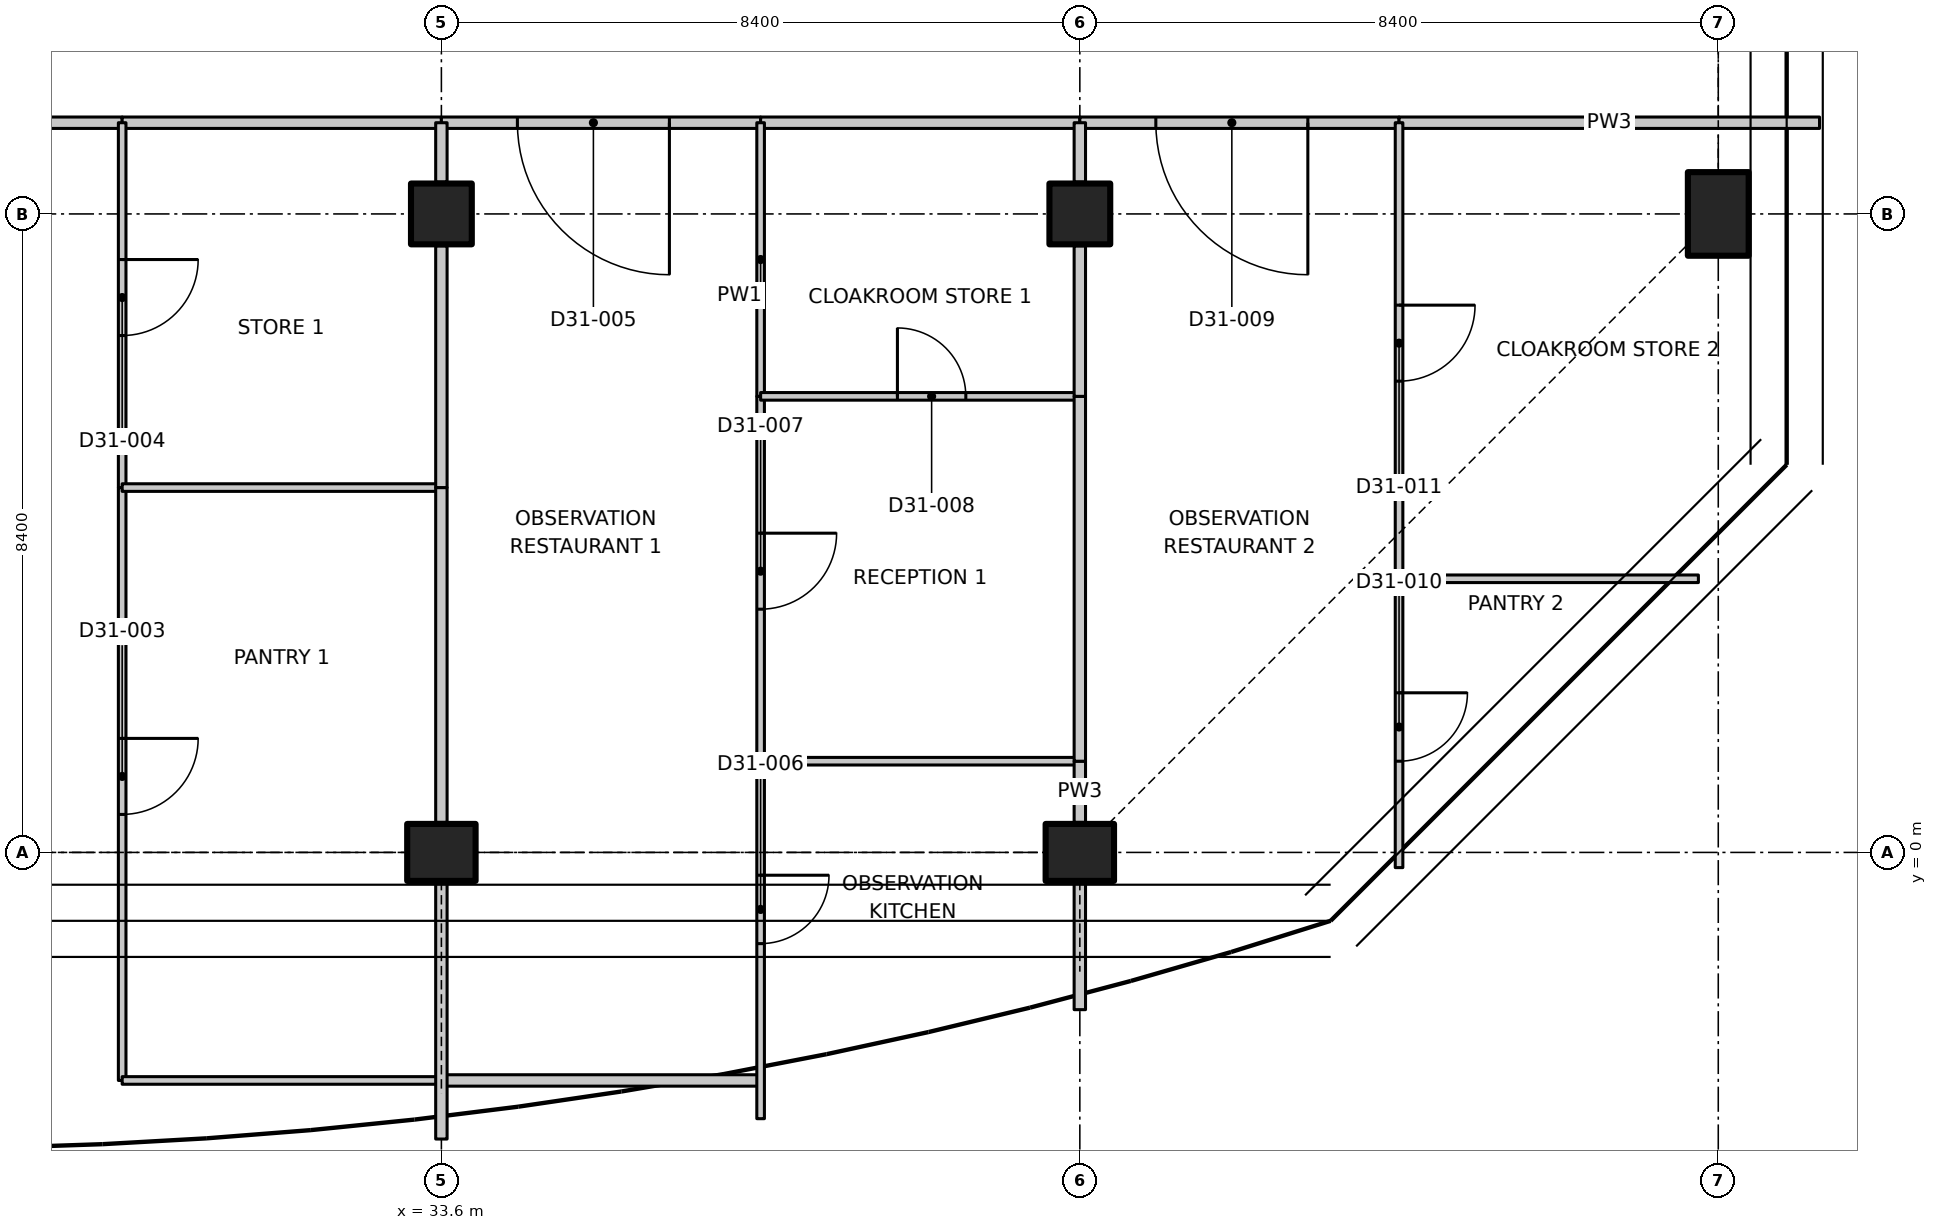
"""IFC4 building model, lengths in metres.
Left out: names, types, materials, properties, quantities, classifications, styles, units other than length and angle.
Written with IfcOpenShell. Run it as: python <this file> out.ifc"""

import sys

from ifc_helpers import new_model, si_unit, direction, frame, frame_2d, origin, origin_2d, place, context, subcontext, project, spatial, polyline, rectangle, outline, extrude, element, fill, save


model = new_model("IFC4")
c1 = context("Model", 3, precision=1e-05, world=origin(), true_north=direction((0.0, 1.0)))
c2 = subcontext(c1, "Body", "Model", "MODEL_VIEW")
j1 = project(units=[si_unit("LENGTHUNIT", "METRE"), si_unit("PLANEANGLEUNIT", "RADIAN")], contexts=[c1])
p1 = place(None, origin())
s1 = spatial("IfcSite", under=j1, at=p1, CompositionType="ELEMENT")
p2 = place(p1, origin())
s2 = spatial("IfcBuilding", under=s1, at=p2, CompositionType="ELEMENT")
p3 = place(p2, frame((0.0, 0.0, 251.7)))
s3 = spatial("IfcBuildingStorey", under=s2, at=p3, CompositionType="ELEMENT", Elevation=251.7)
p4 = place(p3, frame((33.6, 0.0, 0.0), z_axis=(0.0, 0.0, 1.0), x_axis=(0.0, 1.0, 0.0)))
e1 = element("IfcColumn", 1, at=p4, inside=s3, PredefinedType="COLUMN", context=c2, shape_type="SweptSolid", body=[
    extrude(rectangle(XDim=0.75, YDim=0.9, at=origin_2d()), origin(), (0.0, 0.0, 1.0), 4.05),
])
p5 = place(p3, frame((33.6, 8.4, 0.0), z_axis=(0.0, 0.0, 1.0), x_axis=(1.0, 0.0, 0.0)))
e2 = element("IfcColumn", 2, at=p5, inside=s3, PredefinedType="COLUMN", context=c2, shape_type="SweptSolid", body=[
    extrude(rectangle(XDim=0.8, YDim=0.8, at=origin_2d()), origin(), (0.0, 0.0, 1.0), 4.05),
])
p6 = place(p3, frame((42.0, 0.0, 0.0), z_axis=(0.0, 0.0, 1.0), x_axis=(0.0, 1.0, 0.0)))
e3 = element("IfcColumn", 3, at=p6, inside=s3, PredefinedType="COLUMN", context=c2, shape_type="SweptSolid", body=[
    extrude(rectangle(XDim=0.75, YDim=0.9, at=origin_2d()), origin(), (0.0, 0.0, 1.0), 4.05),
])
p7 = place(p3, frame((42.0, 8.4, 0.0), z_axis=(0.0, 0.0, 1.0), x_axis=(1.0, 0.0, 0.0)))
e4 = element("IfcColumn", 4, at=p7, inside=s3, PredefinedType="COLUMN", context=c2, shape_type="SweptSolid", body=[
    extrude(rectangle(XDim=0.8, YDim=0.8, at=origin_2d()), origin(), (0.0, 0.0, 1.0), 4.05),
])
p8 = place(p3, frame((50.4, 8.4, 0.0), z_axis=(0.0, 0.0, 1.0), x_axis=(1.0, 0.0, 0.0)))
e5 = element("IfcColumn", 5, at=p8, inside=s3, PredefinedType="COLUMN", context=c2, shape_type="SweptSolid", body=[
    extrude(rectangle(XDim=0.8, YDim=1.1, at=origin_2d()), origin(), (0.0, 0.0, 1.0), 4.05),
])
p9 = place(p3, frame((29.4, 9.6, 0.0), z_axis=(0.0, 0.0, 1.0), x_axis=(-1.0, 0.0, 0.0)))
e6 = element("IfcWall", 6, at=p9, inside=s3, PredefinedType="PARTITIONING", context=c2, shape_type="SweptSolid", body=[
    extrude(rectangle(XDim=4.2, YDim=0.15, at=frame_2d((2.1, 0.0))), origin(), (0.0, 0.0, 1.0), 4.03),
])
p10 = place(p9, frame((1.2, 0.0, 0.0)))
e7 = element("IfcOpeningElement", 7, at=p10, cuts=e6, PredefinedType="OPENING", context=c2, shape_type="SweptSolid", body=[
    extrude(rectangle(XDim=1.6, YDim=2.1, at=frame_2d((0.8, 1.05))), frame((0.0, 0.085, 0.0), z_axis=(0.0, -1.0, 0.0), x_axis=(1.0, 0.0, 0.0)), (0.0, 0.0, 1.0), 0.17),
])
p11 = place(p3, frame((33.6, 9.6, 0.0), z_axis=(0.0, 0.0, 1.0), x_axis=(-1.0, 0.0, 0.0)))
e8 = element("IfcWall", 8, at=p11, inside=s3, PredefinedType="PARTITIONING", context=c2, shape_type="SweptSolid", body=[
    extrude(rectangle(XDim=4.2, YDim=0.15, at=frame_2d((2.1, 0.0))), origin(), (0.0, 0.0, 1.0), 4.03),
])
p12 = place(p3, frame((37.8, 9.6, 0.0), z_axis=(0.0, 0.0, 1.0), x_axis=(-1.0, 0.0, 0.0)))
e9 = element("IfcWall", 9, at=p12, inside=s3, PredefinedType="PARTITIONING", context=c2, shape_type="SweptSolid", body=[
    extrude(rectangle(XDim=4.2, YDim=0.15, at=frame_2d((2.1, 0.0))), origin(), (0.0, 0.0, 1.0), 4.03),
])
p13 = place(p12, frame((1.2, 0.0, 0.0)))
e10 = element("IfcOpeningElement", 10, at=p13, cuts=e9, PredefinedType="OPENING", context=c2, shape_type="SweptSolid", body=[
    extrude(rectangle(XDim=2.0, YDim=2.4, at=frame_2d((1.0, 1.2))), frame((0.0, 0.085, 0.0), z_axis=(0.0, -1.0, 0.0), x_axis=(1.0, 0.0, 0.0)), (0.0, 0.0, 1.0), 0.17),
])
p14 = place(p3, frame((42.0, 9.6, 0.0), z_axis=(0.0, 0.0, 1.0), x_axis=(-1.0, 0.0, 0.0)))
e11 = element("IfcWall", 11, at=p14, inside=s3, PredefinedType="PARTITIONING", context=c2, shape_type="SweptSolid", body=[
    extrude(rectangle(XDim=4.2, YDim=0.15, at=frame_2d((2.1, 0.0))), origin(), (0.0, 0.0, 1.0), 4.03),
])
p15 = place(p3, frame((46.2, 9.6, 0.0), z_axis=(0.0, 0.0, 1.0), x_axis=(-1.0, 0.0, 0.0)))
e12 = element("IfcWall", 12, at=p15, inside=s3, PredefinedType="PARTITIONING", context=c2, shape_type="SweptSolid", body=[
    extrude(rectangle(XDim=4.2, YDim=0.15, at=frame_2d((2.1, 0.0))), origin(), (0.0, 0.0, 1.0), 4.03),
])
p16 = place(p15, frame((1.2, 0.0, 0.0)))
e13 = element("IfcOpeningElement", 13, at=p16, cuts=e12, PredefinedType="OPENING", context=c2, shape_type="SweptSolid", body=[
    extrude(rectangle(XDim=2.0, YDim=2.4, at=frame_2d((1.0, 1.2))), frame((0.0, 0.085, 0.0), z_axis=(0.0, -1.0, 0.0), x_axis=(1.0, 0.0, 0.0)), (0.0, 0.0, 1.0), 0.17),
])
p17 = place(p3, frame((51.732, 9.6, 0.0), z_axis=(0.0, 0.0, 1.0), x_axis=(-1.0, 0.0, 0.0)))
e14 = element("IfcWall", 14, at=p17, inside=s3, PredefinedType="PARTITIONING", context=c2, shape_type="SweptSolid", body=[
    extrude(outline(polyline([(0.0, 0.0), (5.532, 0.0), (5.532, 4.03), (1.782, 4.03), (1.78, 3.68), (0.884, 3.68), (0.882, 4.03), (0.252, 4.03), (0.0, 4.03), (0.0, 0.0)])), frame((0.0, 0.075, 0.0), z_axis=(0.0, -1.0, 0.0), x_axis=(1.0, 0.0, 0.0)), (0.0, 0.0, 1.0), 0.15),
])
p18 = place(p3, frame((29.4, 4.8, 0.0), z_axis=(0.0, 0.0, 1.0), x_axis=(0.0, -1.0, 0.0)))
e15 = element("IfcWall", 15, at=p18, inside=s3, PredefinedType="PARTITIONING", context=c2, shape_type="SweptSolid", body=[
    extrude(outline(polyline([(0.0, 0.0), (7.8, 0.0), (7.8, 4.03), (5.25, 4.03), (5.248, 3.68), (4.352, 3.68), (4.35, 4.03), (0.0, 4.03), (0.0, 0.0)])), frame((0.0, 0.05, 0.0), z_axis=(0.0, -1.0, 0.0), x_axis=(1.0, 0.0, 0.0)), (0.0, 0.0, 1.0), 0.1),
])
p19 = place(p18, frame((3.3, 0.0, 0.0)))
e16 = element("IfcOpeningElement", 16, at=p19, cuts=e15, PredefinedType="OPENING", context=c2, shape_type="SweptSolid", body=[
    extrude(rectangle(XDim=1.0, YDim=2.1, at=frame_2d((0.5, 1.05))), frame((0.0, 0.06, 0.0), z_axis=(0.0, -1.0, 0.0), x_axis=(1.0, 0.0, 0.0)), (0.0, 0.0, 1.0), 0.12),
])
p20 = place(p3, frame((29.4, -3.0, 0.0), z_axis=(0.0, 0.0, 1.0), x_axis=(1.0, 0.0, 0.0)))
e17 = element("IfcWall", 17, at=p20, inside=s3, PredefinedType="PARTITIONING", context=c2, shape_type="SweptSolid", body=[
    extrude(rectangle(XDim=4.2, YDim=0.1, at=frame_2d((2.1, 0.0))), origin(), (0.0, 0.0, 1.0), 3.68),
])
p21 = place(p3, frame((29.4, 9.6, 0.0), z_axis=(0.0, 0.0, 1.0), x_axis=(0.0, -1.0, 0.0)))
e18 = element("IfcWall", 18, at=p21, inside=s3, PredefinedType="PARTITIONING", context=c2, shape_type="SweptSolid", body=[
    extrude(rectangle(XDim=4.8, YDim=0.1, at=frame_2d((2.4, 0.0))), origin(), (0.0, 0.0, 1.0), 4.03),
])
p22 = place(p21, frame((1.8, 0.0, 0.0)))
e19 = element("IfcOpeningElement", 19, at=p22, cuts=e18, PredefinedType="OPENING", context=c2, shape_type="SweptSolid", body=[
    extrude(rectangle(XDim=1.0, YDim=2.1, at=frame_2d((0.5, 1.05))), frame((0.0, 0.06, 0.0), z_axis=(0.0, -1.0, 0.0), x_axis=(1.0, 0.0, 0.0)), (0.0, 0.0, 1.0), 0.12),
])
p23 = place(p3, frame((33.6, -3.0, 0.0), z_axis=(0.0, 0.0, 1.0), x_axis=(1.0, 0.0, 0.0)))
e20 = element("IfcWall", 20, at=p23, inside=s3, PredefinedType="PARTITIONING", context=c2, shape_type="SweptSolid", body=[
    extrude(rectangle(XDim=4.236, YDim=0.15, at=frame_2d((2.118, 0.0))), origin(), (0.0, 0.0, 1.0), 3.68),
])
p24 = place(p3, frame((29.4, 4.8, 0.0), z_axis=(0.0, 0.0, 1.0), x_axis=(1.0, 0.0, 0.0)))
e21 = element("IfcWall", 21, at=p24, inside=s3, PredefinedType="PARTITIONING", context=c2, shape_type="SweptSolid", body=[
    extrude(rectangle(XDim=4.2, YDim=0.1, at=frame_2d((2.1, 0.0))), origin(), (0.0, 0.0, 1.0), 4.03),
])
p25 = place(p3, frame((33.6, 4.8, 0.0), z_axis=(0.0, 0.0, 1.0), x_axis=(0.0, -1.0, 0.0)))
e22 = element("IfcWall", 22, at=p25, inside=s3, PredefinedType="PARTITIONING", context=c2, shape_type="SweptSolid", body=[
    extrude(rectangle(XDim=4.405, YDim=0.15, at=frame_2d((2.203, 0.0))), origin(), (0.0, 0.0, 1.0), 3.68),
])
p26 = place(p3, frame((33.6, -0.395, 0.0), z_axis=(0.0, 0.0, 1.0), x_axis=(0.0, -1.0, 0.0)))
e23 = element("IfcWall", 23, at=p26, inside=s3, PredefinedType="PARTITIONING", context=c2, shape_type="SweptSolid", body=[
    extrude(rectangle(XDim=3.376, YDim=0.15, at=frame_2d((1.688, 0.0))), origin(), (0.0, 0.0, 1.0), 3.68),
])
p27 = place(p3, frame((33.6, 9.6, 0.0), z_axis=(0.0, 0.0, 1.0), x_axis=(0.0, -1.0, 0.0)))
e24 = element("IfcWall", 24, at=p27, inside=s3, PredefinedType="PARTITIONING", context=c2, shape_type="SweptSolid", body=[
    extrude(rectangle(XDim=0.78, YDim=0.15, at=frame_2d((0.39, 0.0))), origin(), (0.0, 0.0, 1.0), 4.03),
])
p28 = place(p3, frame((33.6, 7.98, 0.0), z_axis=(0.0, 0.0, 1.0), x_axis=(0.0, -1.0, 0.0)))
e25 = element("IfcWall", 25, at=p28, inside=s3, PredefinedType="PARTITIONING", context=c2, shape_type="SweptSolid", body=[
    extrude(rectangle(XDim=3.18, YDim=0.15, at=frame_2d((1.59, 0.0))), origin(), (0.0, 0.0, 1.0), 4.03),
])
p29 = place(p3, frame((37.8, 1.2, 0.0), z_axis=(0.0, 0.0, 1.0), x_axis=(0.0, -1.0, 0.0)))
e26 = element("IfcWall", 26, at=p29, inside=s3, PredefinedType="PARTITIONING", context=c2, shape_type="SweptSolid", body=[
    extrude(rectangle(XDim=4.703, YDim=0.1, at=frame_2d((2.352, 0.0))), origin(), (0.0, 0.0, 1.0), 3.68),
])
p30 = place(p29, frame((1.5, 0.0, 0.0)))
e27 = element("IfcOpeningElement", 27, at=p30, cuts=e26, PredefinedType="OPENING", context=c2, shape_type="SweptSolid", body=[
    extrude(rectangle(XDim=0.9, YDim=2.1, at=frame_2d((0.45, 1.05))), frame((0.0, 0.06, 0.0), z_axis=(0.0, -1.0, 0.0), x_axis=(1.0, 0.0, 0.0)), (0.0, 0.0, 1.0), 0.12),
])
p31 = place(p3, frame((37.8, 6.0, 0.0), z_axis=(0.0, 0.0, 1.0), x_axis=(0.0, -1.0, 0.0)))
e28 = element("IfcWall", 28, at=p31, inside=s3, PredefinedType="PARTITIONING", context=c2, shape_type="SweptSolid", body=[
    extrude(rectangle(XDim=4.8, YDim=0.1, at=frame_2d((2.4, 0.0))), origin(), (0.0, 0.0, 1.0), 4.03),
])
p32 = place(p31, frame((1.8, 0.0, 0.0)))
e29 = element("IfcOpeningElement", 29, at=p32, cuts=e28, PredefinedType="OPENING", context=c2, shape_type="SweptSolid", body=[
    extrude(rectangle(XDim=1.0, YDim=2.1, at=frame_2d((0.5, 1.05))), frame((0.0, 0.06, 0.0), z_axis=(0.0, -1.0, 0.0), x_axis=(1.0, 0.0, 0.0)), (0.0, 0.0, 1.0), 0.12),
])
p33 = place(p3, frame((37.8, 9.6, 0.0), z_axis=(0.0, 0.0, 1.0), x_axis=(0.0, -1.0, 0.0)))
e30 = element("IfcWall", 30, at=p33, inside=s3, PredefinedType="PARTITIONING", context=c2, shape_type="SweptSolid", body=[
    extrude(rectangle(XDim=3.6, YDim=0.1, at=frame_2d((1.8, 0.0))), origin(), (0.0, 0.0, 1.0), 4.03),
])
p34 = place(p3, frame((37.8, 1.2, 0.0), z_axis=(0.0, 0.0, 1.0), x_axis=(1.0, 0.0, 0.0)))
e31 = element("IfcWall", 31, at=p34, inside=s3, PredefinedType="PARTITIONING", context=c2, shape_type="SweptSolid", body=[
    extrude(rectangle(XDim=4.2, YDim=0.1, at=frame_2d((2.1, 0.0))), origin(), (0.0, 0.0, 1.0), 4.03),
])
p35 = place(p3, frame((42.0, 1.2, 0.0), z_axis=(0.0, 0.0, 1.0), x_axis=(0.0, -1.0, 0.0)))
e32 = element("IfcWall", 32, at=p35, inside=s3, PredefinedType="PARTITIONING", context=c2, shape_type="SweptSolid", body=[
    extrude(rectangle(XDim=0.805, YDim=0.15, at=frame_2d((0.402, 0.0))), origin(), (0.0, 0.0, 1.0), 3.68),
])
p36 = place(p3, frame((42.0, -0.395, 0.0), z_axis=(0.0, 0.0, 1.0), x_axis=(0.0, -1.0, 0.0)))
e33 = element("IfcWall", 33, at=p36, inside=s3, PredefinedType="PARTITIONING", context=c2, shape_type="SweptSolid", body=[
    extrude(rectangle(XDim=1.674, YDim=0.15, at=frame_2d((0.837, 0.0))), origin(), (0.0, 0.0, 1.0), 3.68),
])
p37 = place(p3, frame((37.8, 6.0, 0.0), z_axis=(0.0, 0.0, 1.0), x_axis=(1.0, 0.0, 0.0)))
e34 = element("IfcWall", 34, at=p37, inside=s3, PredefinedType="PARTITIONING", context=c2, shape_type="SweptSolid", body=[
    extrude(rectangle(XDim=4.2, YDim=0.1, at=frame_2d((2.1, 0.0))), origin(), (0.0, 0.0, 1.0), 4.03),
])
p38 = place(p37, frame((1.8, 0.0, 0.0)))
e35 = element("IfcOpeningElement", 35, at=p38, cuts=e34, PredefinedType="OPENING", context=c2, shape_type="SweptSolid", body=[
    extrude(rectangle(XDim=0.9, YDim=2.1, at=frame_2d((0.45, 1.05))), frame((0.0, 0.06, 0.0), z_axis=(0.0, -1.0, 0.0), x_axis=(1.0, 0.0, 0.0)), (0.0, 0.0, 1.0), 0.12),
])
p39 = place(p3, frame((42.0, 6.0, 0.0), z_axis=(0.0, 0.0, 1.0), x_axis=(0.0, -1.0, 0.0)))
e36 = element("IfcWall", 36, at=p39, inside=s3, PredefinedType="PARTITIONING", context=c2, shape_type="SweptSolid", body=[
    extrude(rectangle(XDim=4.8, YDim=0.15, at=frame_2d((2.4, 0.0))), origin(), (0.0, 0.0, 1.0), 4.03),
])
p40 = place(p3, frame((42.0, 9.6, 0.0), z_axis=(0.0, 0.0, 1.0), x_axis=(0.0, -1.0, 0.0)))
e37 = element("IfcWall", 37, at=p40, inside=s3, PredefinedType="PARTITIONING", context=c2, shape_type="SweptSolid", body=[
    extrude(rectangle(XDim=0.78, YDim=0.15, at=frame_2d((0.39, 0.0))), origin(), (0.0, 0.0, 1.0), 4.03),
])
p41 = place(p3, frame((42.0, 7.98, 0.0), z_axis=(0.0, 0.0, 1.0), x_axis=(0.0, -1.0, 0.0)))
e38 = element("IfcWall", 38, at=p41, inside=s3, PredefinedType="PARTITIONING", context=c2, shape_type="SweptSolid", body=[
    extrude(rectangle(XDim=1.98, YDim=0.15, at=frame_2d((0.99, 0.0))), origin(), (0.0, 0.0, 1.0), 4.03),
])
p42 = place(p3, frame((46.2, 3.6, 0.0), z_axis=(0.0, 0.0, 1.0), x_axis=(0.0, -1.0, 0.0)))
e39 = element("IfcWall", 39, at=p42, inside=s3, PredefinedType="PARTITIONING", context=c2, shape_type="SweptSolid", body=[
    extrude(rectangle(XDim=3.8, YDim=0.1, at=frame_2d((1.9, 0.0))), origin(), (0.0, 0.0, 1.0), 3.68),
])
p43 = place(p42, frame((1.5, 0.0, 0.0)))
e40 = element("IfcOpeningElement", 40, at=p43, cuts=e39, PredefinedType="OPENING", context=c2, shape_type="SweptSolid", body=[
    extrude(rectangle(XDim=0.9, YDim=2.1, at=frame_2d((0.45, 1.05))), frame((0.0, 0.06, 0.0), z_axis=(0.0, -1.0, 0.0), x_axis=(1.0, 0.0, 0.0)), (0.0, 0.0, 1.0), 0.12),
])
p44 = place(p3, frame((46.2, 9.6, 0.0), z_axis=(0.0, 0.0, 1.0), x_axis=(0.0, -1.0, 0.0)))
e41 = element("IfcWall", 41, at=p44, inside=s3, PredefinedType="PARTITIONING", context=c2, shape_type="SweptSolid", body=[
    extrude(outline(polyline([(0.0, 0.0), (6.0, 0.0), (6.0, 3.68), (4.736, 3.68), (4.734, 4.03), (0.0, 4.03), (0.0, 0.0)])), frame((0.0, 0.05, 0.0), z_axis=(0.0, -1.0, 0.0), x_axis=(1.0, 0.0, 0.0)), (0.0, 0.0, 1.0), 0.1),
])
p45 = place(p44, frame((2.4, 0.0, 0.0)))
e42 = element("IfcOpeningElement", 42, at=p45, cuts=e41, PredefinedType="OPENING", context=c2, shape_type="SweptSolid", body=[
    extrude(rectangle(XDim=1.0, YDim=2.1, at=frame_2d((0.5, 1.05))), frame((0.0, 0.06, 0.0), z_axis=(0.0, -1.0, 0.0), x_axis=(1.0, 0.0, 0.0)), (0.0, 0.0, 1.0), 0.12),
])
p46 = place(p3, frame((46.2, 3.6, 0.0), z_axis=(0.0, 0.0, 1.0), x_axis=(1.0, 0.0, 0.0)))
e43 = element("IfcWall", 43, at=p46, inside=s3, PredefinedType="PARTITIONING", context=c2, shape_type="SweptSolid", body=[
    extrude(rectangle(XDim=3.938, YDim=0.1, at=frame_2d((1.969, 0.0))), origin(), (0.0, 0.0, 1.0), 3.68),
])
p47 = place(p19, origin())
e44 = element("IfcDoor", 44, at=p47, inside=s3, OperationType="SINGLE_SWING_LEFT", PredefinedType="DOOR", context=c2, shape_type="SweptSolid", body=[
    extrude(rectangle(XDim=1.0, YDim=2.1, at=frame_2d((0.5, 1.05))), frame((0.0, 0.025, 0.0), z_axis=(0.0, -1.0, 0.0), x_axis=(1.0, 0.0, 0.0)), (0.0, 0.0, 1.0), 0.05),
])
fill(e16, e44)
p48 = place(p22, origin())
e45 = element("IfcDoor", 45, at=p48, inside=s3, OperationType="SINGLE_SWING_LEFT", PredefinedType="DOOR", context=c2, shape_type="SweptSolid", body=[
    extrude(rectangle(XDim=1.0, YDim=2.1, at=frame_2d((0.5, 1.05))), frame((0.0, 0.025, 0.0), z_axis=(0.0, -1.0, 0.0), x_axis=(1.0, 0.0, 0.0)), (0.0, 0.0, 1.0), 0.05),
])
fill(e19, e45)
p49 = place(p13, origin())
e46 = element("IfcDoor", 46, at=p49, inside=s3, OperationType="DOUBLE_DOOR_SINGLE_SWING", PredefinedType="DOOR", context=c2, shape_type="SweptSolid", body=[
    extrude(rectangle(XDim=2.0, YDim=2.4, at=frame_2d((1.0, 1.2))), frame((0.0, 0.025, 0.0), z_axis=(0.0, -1.0, 0.0), x_axis=(1.0, 0.0, 0.0)), (0.0, 0.0, 1.0), 0.05),
])
fill(e10, e46)
p50 = place(p30, origin())
e47 = element("IfcDoor", 47, at=p50, inside=s3, OperationType="SINGLE_SWING_LEFT", PredefinedType="DOOR", context=c2, shape_type="SweptSolid", body=[
    extrude(rectangle(XDim=0.9, YDim=2.1, at=frame_2d((0.45, 1.05))), frame((0.0, 0.025, 0.0), z_axis=(0.0, -1.0, 0.0), x_axis=(1.0, 0.0, 0.0)), (0.0, 0.0, 1.0), 0.05),
])
fill(e27, e47)
p51 = place(p32, origin())
e48 = element("IfcDoor", 48, at=p51, inside=s3, OperationType="SINGLE_SWING_LEFT", PredefinedType="DOOR", context=c2, shape_type="SweptSolid", body=[
    extrude(rectangle(XDim=1.0, YDim=2.1, at=frame_2d((0.5, 1.05))), frame((0.0, 0.025, 0.0), z_axis=(0.0, -1.0, 0.0), x_axis=(1.0, 0.0, 0.0)), (0.0, 0.0, 1.0), 0.05),
])
fill(e29, e48)
p52 = place(p38, origin())
e49 = element("IfcDoor", 49, at=p52, inside=s3, OperationType="SINGLE_SWING_LEFT", PredefinedType="DOOR", context=c2, shape_type="SweptSolid", body=[
    extrude(rectangle(XDim=0.9, YDim=2.1, at=frame_2d((0.45, 1.05))), frame((0.0, 0.025, 0.0), z_axis=(0.0, -1.0, 0.0), x_axis=(1.0, 0.0, 0.0)), (0.0, 0.0, 1.0), 0.05),
])
fill(e35, e49)
p53 = place(p16, origin())
e50 = element("IfcDoor", 50, at=p53, inside=s3, OperationType="DOUBLE_DOOR_SINGLE_SWING", PredefinedType="DOOR", context=c2, shape_type="SweptSolid", body=[
    extrude(rectangle(XDim=2.0, YDim=2.4, at=frame_2d((1.0, 1.2))), frame((0.0, 0.025, 0.0), z_axis=(0.0, -1.0, 0.0), x_axis=(1.0, 0.0, 0.0)), (0.0, 0.0, 1.0), 0.05),
])
fill(e13, e50)
p54 = place(p43, origin())
e51 = element("IfcDoor", 51, at=p54, inside=s3, OperationType="SINGLE_SWING_LEFT", PredefinedType="DOOR", context=c2, shape_type="SweptSolid", body=[
    extrude(rectangle(XDim=0.9, YDim=2.1, at=frame_2d((0.45, 1.05))), frame((0.0, 0.025, 0.0), z_axis=(0.0, -1.0, 0.0), x_axis=(1.0, 0.0, 0.0)), (0.0, 0.0, 1.0), 0.05),
])
fill(e40, e51)
p55 = place(p45, origin())
e52 = element("IfcDoor", 52, at=p55, inside=s3, OperationType="SINGLE_SWING_LEFT", PredefinedType="DOOR", context=c2, shape_type="SweptSolid", body=[
    extrude(rectangle(XDim=1.0, YDim=2.1, at=frame_2d((0.5, 1.05))), frame((0.0, 0.025, 0.0), z_axis=(0.0, -1.0, 0.0), x_axis=(1.0, 0.0, 0.0)), (0.0, 0.0, 1.0), 0.05),
])
fill(e42, e52)
save(model, sys.argv[1])
